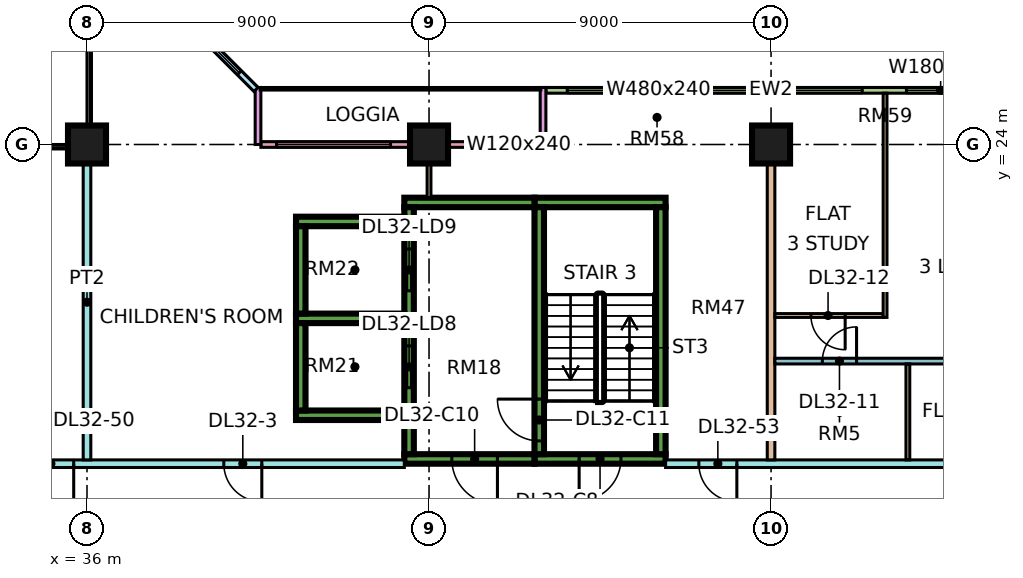
"""IFC4 building model, lengths in metres.
Left out: names, types, materials, properties, quantities, classifications, styles, units other than length and angle.
Written with IfcOpenShell. Run it as: python <this file> out.ifc"""

import sys

from ifc_helpers import new_model, si_unit, direction, frame, frame_2d, origin, origin_2d, place, context, subcontext, project, spatial, rectangle, extrude, element, fill, save


model = new_model("IFC4")
c1 = context("Model", 3, precision=1e-05, world=origin(), true_north=direction((0.0, 1.0)))
c2 = subcontext(c1, "Body", "Model", "MODEL_VIEW")
j1 = project(units=[si_unit("LENGTHUNIT", "METRE"), si_unit("PLANEANGLEUNIT", "RADIAN")], contexts=[c1])
p1 = place(None, origin())
s1 = spatial("IfcSite", under=j1, at=p1, CompositionType="ELEMENT")
p2 = place(p1, origin())
s2 = spatial("IfcBuilding", under=s1, at=p2, CompositionType="ELEMENT")
p3 = place(p2, frame((0.0, 0.0, 136.9)))
s3 = spatial("IfcBuildingStorey", under=s2, at=p3, CompositionType="ELEMENT", Elevation=136.9)
for number, where, z_axis, x_axis in (
    (1, (36.0, 24.0, 0.0), (0.0, 0.0, 1.0), (1.0, 0.0, 0.0)),
    (2, (45.0, 24.0, 0.0), (0.0, 0.0, 1.0), (1.0, 0.0, 0.0)),
    (3, (54.0, 24.0, 0.0), (0.0, 0.0, 1.0), (1.0, 0.0, 0.0)),
):
    element("IfcColumn", number, at=place(p3, frame(where, z_axis=z_axis, x_axis=x_axis)), inside=s3, PredefinedType="COLUMN", context=c2, shape_type="SweptSolid", body=[
        extrude(rectangle(XDim=1.0, YDim=1.0, at=origin_2d()), origin(), (0.0, 0.0, 1.0), 3.75),
    ])
p4 = place(p3, frame((47.775, 15.725, 0.0), z_axis=(0.0, 0.0, 1.0), x_axis=(1.0, 0.0, 0.0)))
e4 = element("IfcWall", 4, at=p4, inside=s3, PredefinedType="SHEAR", context=c2, shape_type="SweptSolid", body=[
    extrude(rectangle(XDim=3.45, YDim=0.25, at=frame_2d((1.725, 0.0))), origin(), (0.0, 0.0, 1.0), 3.75),
])
p5 = place(p4, frame((1.175, 0.0, 0.0)))
e5 = element("IfcOpeningElement", 5, at=p5, cuts=e4, PredefinedType="OPENING", context=c2, shape_type="SweptSolid", body=[
    extrude(rectangle(XDim=1.1, YDim=2.2, at=frame_2d((0.55, 1.1))), frame((0.0, 0.135, 0.0), z_axis=(0.0, -1.0, 0.0), x_axis=(1.0, 0.0, 0.0)), (0.0, 0.0, 1.0), 0.27),
])
p6 = place(p3, frame((47.775, 22.475, 0.0), z_axis=(0.0, 0.0, 1.0), x_axis=(1.0, 0.0, 0.0)))
e6 = element("IfcWall", 6, at=p6, inside=s3, PredefinedType="SHEAR", context=c2, shape_type="SweptSolid", body=[
    extrude(rectangle(XDim=3.45, YDim=0.25, at=frame_2d((1.725, 0.0))), origin(), (0.0, 0.0, 1.0), 3.75),
])
p7 = place(p3, frame((47.9, 15.85, 0.0), z_axis=(0.0, 0.0, 1.0), x_axis=(0.0, 1.0, 0.0)))
e7 = element("IfcWall", 7, at=p7, inside=s3, PredefinedType="SHEAR", context=c2, shape_type="SweptSolid", body=[
    extrude(rectangle(XDim=6.5, YDim=0.25, at=frame_2d((3.25, 0.0))), origin(), (0.0, 0.0, 1.0), 3.75),
])
p8 = place(p7, frame((0.35, 0.0, 0.0)))
e8 = element("IfcOpeningElement", 8, at=p8, cuts=e7, PredefinedType="OPENING", context=c2, shape_type="SweptSolid", body=[
    extrude(rectangle(XDim=1.1, YDim=2.2, at=frame_2d((0.55, 1.1))), frame((0.0, 0.135, 0.0), z_axis=(0.0, -1.0, 0.0), x_axis=(1.0, 0.0, 0.0)), (0.0, 0.0, 1.0), 0.27),
])
p9 = place(p3, frame((51.1, 15.85, 0.0), z_axis=(0.0, 0.0, 1.0), x_axis=(0.0, 1.0, 0.0)))
e9 = element("IfcWall", 9, at=p9, inside=s3, PredefinedType="SHEAR", context=c2, shape_type="SweptSolid", body=[
    extrude(rectangle(XDim=6.5, YDim=0.25, at=frame_2d((3.25, 0.0))), origin(), (0.0, 0.0, 1.0), 3.75),
])
p10 = place(p3, frame((44.35, 15.725, 0.0), z_axis=(0.0, 0.0, 1.0), x_axis=(1.0, 0.0, 0.0)))
e10 = element("IfcWall", 10, at=p10, inside=s3, PredefinedType="SHEAR", context=c2, shape_type="SweptSolid", body=[
    extrude(rectangle(XDim=3.425, YDim=0.25, at=frame_2d((1.712, 0.0))), origin(), (0.0, 0.0, 1.0), 3.75),
])
p11 = place(p10, frame((1.25, 0.0, 0.0)))
e11 = element("IfcOpeningElement", 11, at=p11, cuts=e10, PredefinedType="OPENING", context=c2, shape_type="SweptSolid", body=[
    extrude(rectangle(XDim=1.2, YDim=2.2, at=frame_2d((0.6, 1.1))), frame((0.0, 0.135, 0.0), z_axis=(0.0, -1.0, 0.0), x_axis=(1.0, 0.0, 0.0)), (0.0, 0.0, 1.0), 0.27),
])
p12 = place(p3, frame((44.35, 22.475, 0.0), z_axis=(0.0, 0.0, 1.0), x_axis=(1.0, 0.0, 0.0)))
e12 = element("IfcWall", 12, at=p12, inside=s3, PredefinedType="SHEAR", context=c2, shape_type="SweptSolid", body=[
    extrude(rectangle(XDim=3.425, YDim=0.25, at=frame_2d((1.712, 0.0))), origin(), (0.0, 0.0, 1.0), 3.75),
])
p13 = place(p3, frame((44.475, 15.85, 0.0), z_axis=(0.0, 0.0, 1.0), x_axis=(0.0, 1.0, 0.0)))
e13 = element("IfcWall", 13, at=p13, inside=s3, PredefinedType="SHEAR", context=c2, shape_type="SweptSolid", body=[
    extrude(rectangle(XDim=6.5, YDim=0.25, at=frame_2d((3.25, 0.0))), origin(), (0.0, 0.0, 1.0), 3.75),
])
p14 = place(p13, frame((1.75, 0.0, 0.0)))
e14 = element("IfcOpeningElement", 14, at=p14, cuts=e13, PredefinedType="OPENING", context=c2, shape_type="SweptSolid", body=[
    extrude(rectangle(XDim=1.1, YDim=2.2, at=frame_2d((0.55, 1.1))), frame((0.0, 0.135, 0.0), z_axis=(0.0, -1.0, 0.0), x_axis=(1.0, 0.0, 0.0)), (0.0, 0.0, 1.0), 0.27),
])
p15 = place(p13, frame((4.3, 0.0, 0.0)))
e15 = element("IfcOpeningElement", 15, at=p15, cuts=e13, PredefinedType="OPENING", context=c2, shape_type="SweptSolid", body=[
    extrude(rectangle(XDim=1.1, YDim=2.2, at=frame_2d((0.55, 1.1))), frame((0.0, 0.135, 0.0), z_axis=(0.0, -1.0, 0.0), x_axis=(1.0, 0.0, 0.0)), (0.0, 0.0, 1.0), 0.27),
])
for number, where, z_axis, x_axis in (
    (16, (41.5, 16.875, 0.0), (0.0, 0.0, 1.0), (1.0, 0.0, 0.0)),
    (17, (41.5, 19.425, 0.0), (0.0, 0.0, 1.0), (1.0, 0.0, 0.0)),
    (18, (41.5, 21.975, 0.0), (0.0, 0.0, 1.0), (1.0, 0.0, 0.0)),
):
    element("IfcWall", number, at=place(p3, frame(where, z_axis=z_axis, x_axis=x_axis)), inside=s3, PredefinedType="SHEAR", context=c2, shape_type="SweptSolid", body=[
        extrude(rectangle(XDim=2.85, YDim=0.25, at=frame_2d((1.425, 0.0))), origin(), (0.0, 0.0, 1.0), 3.75),
    ])
for number, where, z_axis, x_axis in (
    (19, (41.625, 17.0, 0.0), (0.0, 0.0, 1.0), (0.0, 1.0, 0.0)),
    (20, (41.625, 19.55, 0.0), (0.0, 0.0, 1.0), (0.0, 1.0, 0.0)),
):
    element("IfcWall", number, at=place(p3, frame(where, z_axis=z_axis, x_axis=x_axis)), inside=s3, PredefinedType="SHEAR", context=c2, shape_type="SweptSolid", body=[
        extrude(rectangle(XDim=2.3, YDim=0.25, at=frame_2d((1.15, 0.0))), origin(), (0.0, 0.0, 1.0), 3.75),
    ])
p16 = place(p3, frame((59.925, 25.425, 0.0), z_axis=(0.0, 0.0, 1.0), x_axis=(-1.0, 0.0, 0.0)))
e21 = element("IfcWall", 21, at=p16, inside=s3, PredefinedType="SOLIDWALL", context=c2, shape_type="SweptSolid", body=[
    extrude(rectangle(XDim=11.85, YDim=0.15, at=frame_2d((5.925, 0.0))), origin(), (0.0, 0.0, 1.0), 3.3),
])
p17 = place(p16, frame((0.562, 0.0, 0.45)))
e22 = element("IfcOpeningElement", 22, at=p17, cuts=e21, PredefinedType="OPENING", context=c2, shape_type="SweptSolid", body=[
    extrude(rectangle(XDim=1.8, YDim=2.4, at=frame_2d((0.9, 1.2))), frame((0.0, 0.085, 0.0), z_axis=(0.0, -1.0, 0.0), x_axis=(1.0, 0.0, 0.0)), (0.0, 0.0, 1.0), 0.17),
])
p18 = place(p16, frame((3.525, 0.0, 0.45)))
e23 = element("IfcOpeningElement", 23, at=p18, cuts=e21, PredefinedType="OPENING", context=c2, shape_type="SweptSolid", body=[
    extrude(rectangle(XDim=1.8, YDim=2.4, at=frame_2d((0.9, 1.2))), frame((0.0, 0.085, 0.0), z_axis=(0.0, -1.0, 0.0), x_axis=(1.0, 0.0, 0.0)), (0.0, 0.0, 1.0), 0.17),
])
p19 = place(p16, frame((6.488, 0.0, 0.45)))
e24 = element("IfcOpeningElement", 24, at=p19, cuts=e21, PredefinedType="OPENING", context=c2, shape_type="SweptSolid", body=[
    extrude(rectangle(XDim=4.8, YDim=2.4, at=frame_2d((2.4, 1.2))), frame((0.0, 0.085, 0.0), z_axis=(0.0, -1.0, 0.0), x_axis=(1.0, 0.0, 0.0)), (0.0, 0.0, 1.0), 0.17),
])
p20 = place(p3, frame((47.925, 24.0, 0.0), z_axis=(0.0, 0.0, 1.0), x_axis=(-1.0, 0.0, 0.0)))
e25 = element("IfcWall", 25, at=p20, inside=s3, PredefinedType="SOLIDWALL", context=c2, shape_type="SweptSolid", body=[
    extrude(rectangle(XDim=7.35, YDim=0.15, at=frame_2d((3.675, 0.0))), origin(), (0.0, 0.0, 1.0), 3.3),
])
p21 = place(p20, frame((0.562, 0.0, 0.45)))
e26 = element("IfcOpeningElement", 26, at=p21, cuts=e25, PredefinedType="OPENING", context=c2, shape_type="SweptSolid", body=[
    extrude(rectangle(XDim=1.2, YDim=2.4, at=frame_2d((0.6, 1.2))), frame((0.0, 0.085, 0.0), z_axis=(0.0, -1.0, 0.0), x_axis=(1.0, 0.0, 0.0)), (0.0, 0.0, 1.0), 0.17),
])
p22 = place(p20, frame((3.938, 0.0, 0.45)))
e27 = element("IfcOpeningElement", 27, at=p22, cuts=e25, PredefinedType="OPENING", context=c2, shape_type="SweptSolid", body=[
    extrude(rectangle(XDim=3.0, YDim=2.4, at=frame_2d((1.5, 1.2))), frame((0.0, 0.085, 0.0), z_axis=(0.0, -1.0, 0.0), x_axis=(1.0, 0.0, 0.0)), (0.0, 0.0, 1.0), 0.17),
])
for number, where, z_axis, x_axis in (
    (28, (48.0, 25.5, 0.0), (0.0, 0.0, 1.0), (0.0, -1.0, 0.0)),
    (29, (40.5, 25.5, 0.0), (0.0, 0.0, 1.0), (0.0, -1.0, 0.0)),
):
    element("IfcWall", number, at=place(p3, frame(where, z_axis=z_axis, x_axis=x_axis)), inside=s3, PredefinedType="SOLIDWALL", context=c2, shape_type="SweptSolid", body=[
        extrude(rectangle(XDim=1.5, YDim=0.15, at=frame_2d((0.75, 0.0))), origin(), (0.0, 0.0, 1.0), 3.3),
    ])
p23 = place(p3, frame((40.447, 25.447, 0.0), z_axis=(0.0, 0.0, 1.0), x_axis=(-0.707106781187, 0.707106781187, 0.0)))
e30 = element("IfcWall", 30, at=p23, inside=s3, PredefinedType="SOLIDWALL", context=c2, shape_type="SweptSolid", body=[
    extrude(rectangle(XDim=4.243, YDim=0.15, at=frame_2d((2.121, 0.0))), origin(), (0.0, 0.0, 1.0), 3.3),
])
p24 = place(p23, frame((0.621, 0.0, 0.45)))
e31 = element("IfcOpeningElement", 31, at=p24, cuts=e30, PredefinedType="OPENING", context=c2, shape_type="SweptSolid", body=[
    extrude(rectangle(XDim=3.0, YDim=2.4, at=frame_2d((1.5, 1.2))), frame((0.0, 0.085, 0.0), z_axis=(0.0, -1.0, 0.0), x_axis=(1.0, 0.0, 0.0)), (0.0, 0.0, 1.0), 0.17),
])
p25 = place(p3, frame((34.0, 15.6, 0.0), z_axis=(0.0, 0.0, 1.0), x_axis=(1.0, 0.0, 0.0)))
e32 = element("IfcWall", 32, at=p25, inside=s3, PredefinedType="PARTITIONING", context=c2, shape_type="SweptSolid", body=[
    extrude(rectangle(XDim=10.35, YDim=0.2, at=frame_2d((5.175, 0.0))), origin(), (0.0, 0.0, 1.0), 3.3),
])
p26 = place(p25, frame((5.6, 0.0, 0.0)))
e33 = element("IfcOpeningElement", 33, at=p26, cuts=e32, PredefinedType="OPENING", context=c2, shape_type="SweptSolid", body=[
    extrude(rectangle(XDim=1.0, YDim=2.1, at=frame_2d((0.5, 1.05))), frame((0.0, 0.11, 0.0), z_axis=(0.0, -1.0, 0.0), x_axis=(1.0, 0.0, 0.0)), (0.0, 0.0, 1.0), 0.22),
])
p27 = place(p25, frame((0.45, 0.0, 0.0)))
e34 = element("IfcOpeningElement", 34, at=p27, cuts=e32, PredefinedType="OPENING", context=c2, shape_type="SweptSolid", body=[
    extrude(rectangle(XDim=1.2, YDim=2.1, at=frame_2d((0.6, 1.05))), frame((0.0, 0.11, 0.0), z_axis=(0.0, -1.0, 0.0), x_axis=(1.0, 0.0, 0.0)), (0.0, 0.0, 1.0), 0.22),
])
p28 = place(p3, frame((36.0, 15.7, 0.0), z_axis=(0.0, 0.0, 1.0), x_axis=(0.0, 1.0, 0.0)))
e35 = element("IfcWall", 35, at=p28, inside=s3, PredefinedType="PARTITIONING", context=c2, shape_type="SweptSolid", body=[
    extrude(rectangle(XDim=8.3, YDim=0.2, at=frame_2d((4.15, 0.0))), origin(), (0.0, 0.0, 1.0), 3.3),
])
p29 = place(p3, frame((45.0, 22.6, 0.0), z_axis=(0.0, 0.0, 1.0), x_axis=(0.0, 1.0, 0.0)))
e36 = element("IfcWall", 36, at=p29, inside=s3, PredefinedType="PARTITIONING", context=c2, shape_type="SweptSolid", body=[
    extrude(rectangle(XDim=1.326, YDim=0.1, at=frame_2d((0.663, 0.0))), origin(), (0.0, 0.0, 1.0), 3.3),
])
p30 = place(p3, frame((51.225, 15.6, 0.0), z_axis=(0.0, 0.0, 1.0), x_axis=(1.0, 0.0, 0.0)))
e37 = element("IfcWall", 37, at=p30, inside=s3, PredefinedType="PARTITIONING", context=c2, shape_type="SweptSolid", body=[
    extrude(rectangle(XDim=20.701, YDim=0.2, at=frame_2d((10.351, 0.0))), origin(), (0.0, 0.0, 1.0), 3.3),
])
p31 = place(p30, frame((15.875, 0.0, 0.0)))
e38 = element("IfcOpeningElement", 38, at=p31, cuts=e37, PredefinedType="OPENING", context=c2, shape_type="SweptSolid", body=[
    extrude(rectangle(XDim=1.0, YDim=2.1, at=frame_2d((0.5, 1.05))), frame((0.0, 0.11, 0.0), z_axis=(0.0, -1.0, 0.0), x_axis=(1.0, 0.0, 0.0)), (0.0, 0.0, 1.0), 0.22),
])
p32 = place(p30, frame((0.875, 0.0, 0.0)))
e39 = element("IfcOpeningElement", 39, at=p32, cuts=e37, PredefinedType="OPENING", context=c2, shape_type="SweptSolid", body=[
    extrude(rectangle(XDim=1.0, YDim=2.1, at=frame_2d((0.5, 1.05))), frame((0.0, 0.11, 0.0), z_axis=(0.0, -1.0, 0.0), x_axis=(1.0, 0.0, 0.0)), (0.0, 0.0, 1.0), 0.22),
])
p33 = place(p3, frame((54.0, 15.7, 0.0), z_axis=(0.0, 0.0, 1.0), x_axis=(0.0, 1.0, 0.0)))
e40 = element("IfcWall", 40, at=p33, inside=s3, PredefinedType="PARTITIONING", context=c2, shape_type="SweptSolid", body=[
    extrude(rectangle(XDim=8.3, YDim=0.2, at=frame_2d((4.15, 0.0))), origin(), (0.0, 0.0, 1.0), 3.3),
])
p34 = place(p3, frame((54.1, 18.3, 0.0), z_axis=(0.0, 0.0, 1.0), x_axis=(1.0, 0.0, 0.0)))
e41 = element("IfcWall", 41, at=p34, inside=s3, PredefinedType="PARTITIONING", context=c2, shape_type="SweptSolid", body=[
    extrude(rectangle(XDim=11.975, YDim=0.15, at=frame_2d((5.987, 0.0))), origin(), (0.0, 0.0, 1.0), 3.3),
])
p35 = place(p34, frame((5.45, 0.0, 0.0)))
e42 = element("IfcOpeningElement", 42, at=p35, cuts=e41, PredefinedType="OPENING", context=c2, shape_type="SweptSolid", body=[
    extrude(rectangle(XDim=0.9, YDim=2.1, at=frame_2d((0.45, 1.05))), frame((0.0, 0.085, 0.0), z_axis=(0.0, -1.0, 0.0), x_axis=(1.0, 0.0, 0.0)), (0.0, 0.0, 1.0), 0.17),
])
p36 = place(p34, frame((1.25, 0.0, 0.0)))
e43 = element("IfcOpeningElement", 43, at=p36, cuts=e41, PredefinedType="OPENING", context=c2, shape_type="SweptSolid", body=[
    extrude(rectangle(XDim=0.9, YDim=2.1, at=frame_2d((0.45, 1.05))), frame((0.0, 0.085, 0.0), z_axis=(0.0, -1.0, 0.0), x_axis=(1.0, 0.0, 0.0)), (0.0, 0.0, 1.0), 0.17),
])
p37 = place(p3, frame((54.1, 19.5, 0.0), z_axis=(0.0, 0.0, 1.0), x_axis=(1.0, 0.0, 0.0)))
e44 = element("IfcWall", 44, at=p37, inside=s3, PredefinedType="PARTITIONING", context=c2, shape_type="SweptSolid", body=[
    extrude(rectangle(XDim=2.85, YDim=0.1, at=frame_2d((1.425, 0.0))), origin(), (0.0, 0.0, 1.0), 3.3),
])
p38 = place(p37, frame((0.95, 0.0, 0.0)))
e45 = element("IfcOpeningElement", 45, at=p38, cuts=e44, PredefinedType="OPENING", context=c2, shape_type="SweptSolid", body=[
    extrude(rectangle(XDim=0.9, YDim=2.1, at=frame_2d((0.45, 1.05))), frame((0.0, 0.06, 0.0), z_axis=(0.0, -1.0, 0.0), x_axis=(1.0, 0.0, 0.0)), (0.0, 0.0, 1.0), 0.12),
])
p39 = place(p3, frame((57.0, 19.45, 0.0), z_axis=(0.0, 0.0, 1.0), x_axis=(0.0, 1.0, 0.0)))
e46 = element("IfcWall", 46, at=p39, inside=s3, PredefinedType="PARTITIONING", context=c2, shape_type="SweptSolid", body=[
    extrude(rectangle(XDim=5.9, YDim=0.1, at=frame_2d((2.95, 0.0))), origin(), (0.0, 0.0, 1.0), 3.3),
])
p40 = place(p3, frame((57.6, 15.7, 0.0), z_axis=(0.0, 0.0, 1.0), x_axis=(0.0, 1.0, 0.0)))
e47 = element("IfcWall", 47, at=p40, inside=s3, PredefinedType="PARTITIONING", context=c2, shape_type="SweptSolid", body=[
    extrude(rectangle(XDim=2.525, YDim=0.1, at=frame_2d((1.263, 0.0))), origin(), (0.0, 0.0, 1.0), 3.3),
])
p41 = place(p17, origin())
e48 = element("IfcWindow", 48, at=p41, inside=s3, PartitioningType="SINGLE_PANEL", PredefinedType="WINDOW", context=c2, shape_type="SweptSolid", body=[
    extrude(rectangle(XDim=1.8, YDim=2.4, at=frame_2d((0.9, 1.2))), frame((0.0, 0.03, 0.0), z_axis=(0.0, -1.0, 0.0), x_axis=(1.0, 0.0, 0.0)), (0.0, 0.0, 1.0), 0.06),
])
fill(e22, e48)
p42 = place(p18, origin())
e49 = element("IfcWindow", 49, at=p42, inside=s3, PartitioningType="SINGLE_PANEL", PredefinedType="WINDOW", context=c2, shape_type="SweptSolid", body=[
    extrude(rectangle(XDim=1.8, YDim=2.4, at=frame_2d((0.9, 1.2))), frame((0.0, 0.03, 0.0), z_axis=(0.0, -1.0, 0.0), x_axis=(1.0, 0.0, 0.0)), (0.0, 0.0, 1.0), 0.06),
])
fill(e23, e49)
p43 = place(p19, origin())
e50 = element("IfcWindow", 50, at=p43, inside=s3, PartitioningType="SINGLE_PANEL", PredefinedType="WINDOW", context=c2, shape_type="SweptSolid", body=[
    extrude(rectangle(XDim=4.8, YDim=2.4, at=frame_2d((2.4, 1.2))), frame((0.0, 0.03, 0.0), z_axis=(0.0, -1.0, 0.0), x_axis=(1.0, 0.0, 0.0)), (0.0, 0.0, 1.0), 0.06),
])
fill(e24, e50)
p44 = place(p21, origin())
e51 = element("IfcWindow", 51, at=p44, inside=s3, PartitioningType="SINGLE_PANEL", PredefinedType="WINDOW", context=c2, shape_type="SweptSolid", body=[
    extrude(rectangle(XDim=1.2, YDim=2.4, at=frame_2d((0.6, 1.2))), frame((0.0, 0.03, 0.0), z_axis=(0.0, -1.0, 0.0), x_axis=(1.0, 0.0, 0.0)), (0.0, 0.0, 1.0), 0.06),
])
fill(e26, e51)
p45 = place(p22, origin())
e52 = element("IfcWindow", 52, at=p45, inside=s3, PartitioningType="SINGLE_PANEL", PredefinedType="WINDOW", context=c2, shape_type="SweptSolid", body=[
    extrude(rectangle(XDim=3.0, YDim=2.4, at=frame_2d((1.5, 1.2))), frame((0.0, 0.03, 0.0), z_axis=(0.0, -1.0, 0.0), x_axis=(1.0, 0.0, 0.0)), (0.0, 0.0, 1.0), 0.06),
])
fill(e27, e52)
p46 = place(p24, origin())
e53 = element("IfcWindow", 53, at=p46, inside=s3, PartitioningType="SINGLE_PANEL", PredefinedType="WINDOW", context=c2, shape_type="SweptSolid", body=[
    extrude(rectangle(XDim=3.0, YDim=2.4, at=frame_2d((1.5, 1.2))), frame((0.0, 0.03, 0.0), z_axis=(0.0, -1.0, 0.0), x_axis=(1.0, 0.0, 0.0)), (0.0, 0.0, 1.0), 0.06),
])
fill(e31, e53)
p47 = place(p5, frame((1.1, 0.0, 0.0), z_axis=(0.0, 0.0, 1.0), x_axis=(-1.0, 0.0, 0.0)))
e54 = element("IfcDoor", 54, at=p47, inside=s3, OperationType="SINGLE_SWING_LEFT", PredefinedType="DOOR", context=c2, shape_type="SweptSolid", body=[
    extrude(rectangle(XDim=1.1, YDim=2.2, at=frame_2d((0.55, 1.1))), frame((0.0, 0.025, 0.0), z_axis=(0.0, -1.0, 0.0), x_axis=(1.0, 0.0, 0.0)), (0.0, 0.0, 1.0), 0.05),
])
fill(e5, e54)
p48 = place(p11, origin())
e55 = element("IfcDoor", 55, at=p48, inside=s3, OperationType="SINGLE_SWING_RIGHT", PredefinedType="DOOR", context=c2, shape_type="SweptSolid", body=[
    extrude(rectangle(XDim=1.2, YDim=2.2, at=frame_2d((0.6, 1.1))), frame((0.0, 0.025, 0.0), z_axis=(0.0, -1.0, 0.0), x_axis=(1.0, 0.0, 0.0)), (0.0, 0.0, 1.0), 0.05),
])
fill(e11, e55)
p49 = place(p8, frame((1.1, 0.0, 0.0), z_axis=(0.0, 0.0, 1.0), x_axis=(-1.0, 0.0, 0.0)))
e56 = element("IfcDoor", 56, at=p49, inside=s3, OperationType="SINGLE_SWING_RIGHT", PredefinedType="DOOR", context=c2, shape_type="SweptSolid", body=[
    extrude(rectangle(XDim=1.1, YDim=2.2, at=frame_2d((0.55, 1.1))), frame((0.0, 0.025, 0.0), z_axis=(0.0, -1.0, 0.0), x_axis=(1.0, 0.0, 0.0)), (0.0, 0.0, 1.0), 0.05),
])
fill(e8, e56)
p50 = place(p14, origin())
e57 = element("IfcDoor", 57, at=p50, inside=s3, OperationType="DOUBLE_DOOR_SLIDING", PredefinedType="DOOR", context=c2, shape_type="SweptSolid", body=[
    extrude(rectangle(XDim=1.1, YDim=2.2, at=frame_2d((0.55, 1.1))), frame((0.0, 0.025, 0.0), z_axis=(0.0, -1.0, 0.0), x_axis=(1.0, 0.0, 0.0)), (0.0, 0.0, 1.0), 0.05),
])
fill(e14, e57)
p51 = place(p15, origin())
e58 = element("IfcDoor", 58, at=p51, inside=s3, OperationType="DOUBLE_DOOR_SLIDING", PredefinedType="DOOR", context=c2, shape_type="SweptSolid", body=[
    extrude(rectangle(XDim=1.1, YDim=2.2, at=frame_2d((0.55, 1.1))), frame((0.0, 0.025, 0.0), z_axis=(0.0, -1.0, 0.0), x_axis=(1.0, 0.0, 0.0)), (0.0, 0.0, 1.0), 0.05),
])
fill(e15, e58)
p52 = place(p26, origin())
e59 = element("IfcDoor", 59, at=p52, inside=s3, OperationType="SINGLE_SWING_RIGHT", PredefinedType="DOOR", context=c2, shape_type="SweptSolid", body=[
    extrude(rectangle(XDim=1.0, YDim=2.1, at=frame_2d((0.5, 1.05))), frame((0.0, 0.025, 0.0), z_axis=(0.0, -1.0, 0.0), x_axis=(1.0, 0.0, 0.0)), (0.0, 0.0, 1.0), 0.05),
])
fill(e33, e59)
p53 = place(p36, frame((0.9, 0.0, 0.0), z_axis=(0.0, 0.0, 1.0), x_axis=(-1.0, 0.0, 0.0)))
e60 = element("IfcDoor", 60, at=p53, inside=s3, OperationType="SINGLE_SWING_RIGHT", PredefinedType="DOOR", context=c2, shape_type="SweptSolid", body=[
    extrude(rectangle(XDim=0.9, YDim=2.1, at=frame_2d((0.45, 1.05))), frame((0.0, 0.025, 0.0), z_axis=(0.0, -1.0, 0.0), x_axis=(1.0, 0.0, 0.0)), (0.0, 0.0, 1.0), 0.05),
])
fill(e43, e60)
p54 = place(p38, origin())
e61 = element("IfcDoor", 61, at=p54, inside=s3, OperationType="SINGLE_SWING_RIGHT", PredefinedType="DOOR", context=c2, shape_type="SweptSolid", body=[
    extrude(rectangle(XDim=0.9, YDim=2.1, at=frame_2d((0.45, 1.05))), frame((0.0, 0.025, 0.0), z_axis=(0.0, -1.0, 0.0), x_axis=(1.0, 0.0, 0.0)), (0.0, 0.0, 1.0), 0.05),
])
fill(e45, e61)
p55 = place(p27, origin())
e62 = element("IfcDoor", 62, at=p55, inside=s3, OperationType="SINGLE_SWING_RIGHT", PredefinedType="DOOR", context=c2, shape_type="SweptSolid", body=[
    extrude(rectangle(XDim=1.2, YDim=2.1, at=frame_2d((0.6, 1.05))), frame((0.0, 0.025, 0.0), z_axis=(0.0, -1.0, 0.0), x_axis=(1.0, 0.0, 0.0)), (0.0, 0.0, 1.0), 0.05),
])
fill(e34, e62)
p56 = place(p32, origin())
e63 = element("IfcDoor", 63, at=p56, inside=s3, OperationType="SINGLE_SWING_RIGHT", PredefinedType="DOOR", context=c2, shape_type="SweptSolid", body=[
    extrude(rectangle(XDim=1.0, YDim=2.1, at=frame_2d((0.5, 1.05))), frame((0.0, 0.025, 0.0), z_axis=(0.0, -1.0, 0.0), x_axis=(1.0, 0.0, 0.0)), (0.0, 0.0, 1.0), 0.05),
])
fill(e39, e63)
save(model, sys.argv[1])
